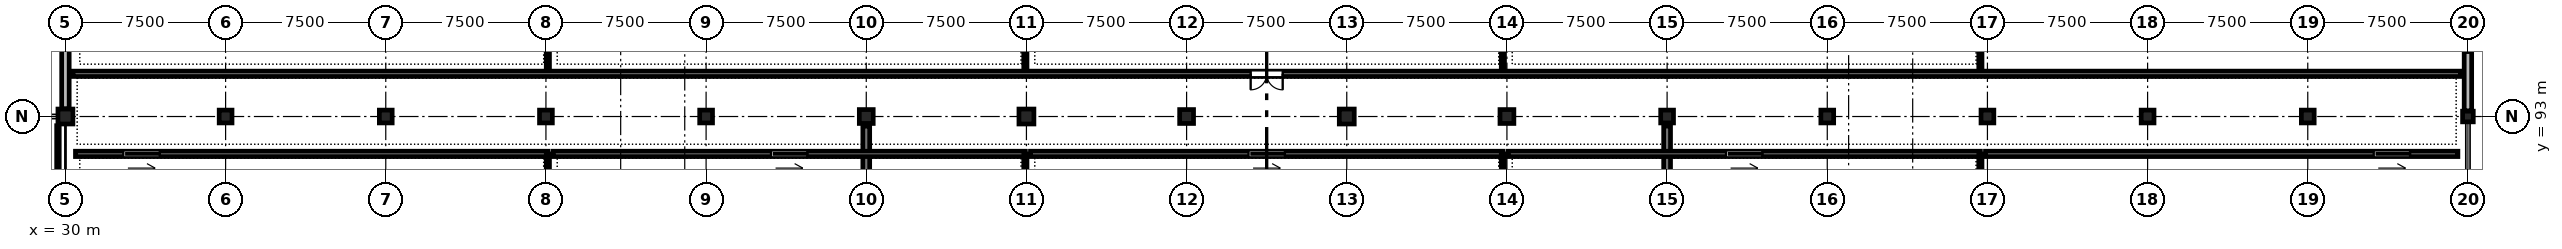
"""IFC4 building model, lengths in metres.
Left out: names, types, materials, properties, quantities, classifications, styles, units other than length and angle.
Written with IfcOpenShell. Run it as: python <this file> out.ifc"""

import sys

from ifc_helpers import new_model, si_unit, direction, frame, frame_2d, origin, origin_2d, place, context, subcontext, project, spatial, rectangle, circle, extrude, element, fill, save


model = new_model("IFC4")
c1 = context("Model", 3, precision=1e-05, world=origin(), true_north=direction((0.0, 1.0)))
c2 = subcontext(c1, "Body", "Model", "MODEL_VIEW")
j1 = project(units=[si_unit("LENGTHUNIT", "METRE"), si_unit("PLANEANGLEUNIT", "RADIAN")], contexts=[c1])
p1 = place(None, origin())
s1 = spatial("IfcSite", under=j1, at=p1, CompositionType="ELEMENT")
p2 = place(p1, origin())
s2 = spatial("IfcBuilding", under=s1, at=p2, CompositionType="ELEMENT")
p3 = place(p2, frame((0.0, 0.0, 9.3)))
s3 = spatial("IfcBuildingStorey", under=s2, at=p3, CompositionType="ELEMENT", Elevation=9.3)
p4 = place(p3, frame((30.0, 93.0, 0.0), z_axis=(0.0, 0.0, 1.0), x_axis=(1.0, 0.0, 0.0)))
e1 = element("IfcColumn", 1, at=p4, inside=s3, PredefinedType="COLUMN", context=c2, shape_type="SweptSolid", body=[
    extrude(rectangle(XDim=0.7, YDim=0.7, at=origin_2d()), origin(), (0.0, 0.0, 1.0), 4.8),
])
p5 = place(p3, frame((37.5, 93.0, 0.0), z_axis=(0.0, 0.0, 1.0), x_axis=(1.0, 0.0, 0.0)))
e2 = element("IfcColumn", 2, at=p5, inside=s3, PredefinedType="COLUMN", context=c2, shape_type="SweptSolid", body=[
    extrude(rectangle(XDim=0.6, YDim=0.6, at=origin_2d()), origin(), (0.0, 0.0, 1.0), 4.8),
])
p6 = place(p3, frame((45.0, 93.0, 0.0), z_axis=(0.0, 0.0, 1.0), x_axis=(1.0, 0.0, 0.0)))
e3 = element("IfcColumn", 3, at=p6, inside=s3, PredefinedType="COLUMN", context=c2, shape_type="SweptSolid", body=[
    extrude(circle(Radius=0.3, at=origin_2d()), origin(), (0.0, 0.0, 1.0), 4.8),
])
for number, where, z_axis, x_axis in (
    (4, (52.5, 93.0, 0.0), (0.0, 0.0, 1.0), (1.0, 0.0, 0.0)),
    (5, (60.0, 93.0, 0.0), (0.0, 0.0, 1.0), (1.0, 0.0, 0.0)),
):
    element("IfcColumn", number, at=place(p3, frame(where, z_axis=z_axis, x_axis=x_axis)), inside=s3, PredefinedType="COLUMN", context=c2, shape_type="SweptSolid", body=[
        extrude(rectangle(XDim=0.6, YDim=0.6, at=origin_2d()), origin(), (0.0, 0.0, 1.0), 4.8),
    ])
p7 = place(p3, frame((67.5, 93.0, 0.0), z_axis=(0.0, 0.0, 1.0), x_axis=(1.0, 0.0, 0.0)))
e6 = element("IfcColumn", 6, at=p7, inside=s3, PredefinedType="COLUMN", context=c2, shape_type="SweptSolid", body=[
    extrude(rectangle(XDim=0.65, YDim=0.65, at=origin_2d()), origin(), (0.0, 0.0, 1.0), 4.8),
])
p8 = place(p3, frame((75.0, 93.0, 0.0), z_axis=(0.0, 0.0, 1.0), x_axis=(1.0, 0.0, 0.0)))
e7 = element("IfcColumn", 7, at=p8, inside=s3, PredefinedType="COLUMN", context=c2, shape_type="SweptSolid", body=[
    extrude(rectangle(XDim=0.7, YDim=0.7, at=origin_2d()), origin(), (0.0, 0.0, 1.0), 4.8),
])
p9 = place(p3, frame((82.5, 93.0, 0.0), z_axis=(0.0, 0.0, 1.0), x_axis=(1.0, 0.0, 0.0)))
e8 = element("IfcColumn", 8, at=p9, inside=s3, PredefinedType="COLUMN", context=c2, shape_type="SweptSolid", body=[
    extrude(rectangle(XDim=0.65, YDim=0.65, at=origin_2d()), origin(), (0.0, 0.0, 1.0), 4.8),
])
p10 = place(p3, frame((90.0, 93.0, 0.0), z_axis=(0.0, 0.0, 1.0), x_axis=(1.0, 0.0, 0.0)))
e9 = element("IfcColumn", 9, at=p10, inside=s3, PredefinedType="COLUMN", context=c2, shape_type="SweptSolid", body=[
    extrude(rectangle(XDim=0.7, YDim=0.7, at=origin_2d()), origin(), (0.0, 0.0, 1.0), 4.8),
])
p11 = place(p3, frame((97.5, 93.0, 0.0), z_axis=(0.0, 0.0, 1.0), x_axis=(1.0, 0.0, 0.0)))
e10 = element("IfcColumn", 10, at=p11, inside=s3, PredefinedType="COLUMN", context=c2, shape_type="SweptSolid", body=[
    extrude(rectangle(XDim=0.65, YDim=0.65, at=origin_2d()), origin(), (0.0, 0.0, 1.0), 4.8),
])
p12 = place(p3, frame((105.0, 93.0, 0.0), z_axis=(0.0, 0.0, 1.0), x_axis=(1.0, 0.0, 0.0)))
e11 = element("IfcColumn", 11, at=p12, inside=s3, PredefinedType="COLUMN", context=c2, shape_type="SweptSolid", body=[
    extrude(rectangle(XDim=0.6, YDim=0.6, at=origin_2d()), origin(), (0.0, 0.0, 1.0), 4.8),
])
p13 = place(p3, frame((112.5, 93.0, 0.0), z_axis=(0.0, 0.0, 1.0), x_axis=(1.0, 0.0, 0.0)))
e12 = element("IfcColumn", 12, at=p13, inside=s3, PredefinedType="COLUMN", context=c2, shape_type="SweptSolid", body=[
    extrude(circle(Radius=0.3, at=origin_2d()), origin(), (0.0, 0.0, 1.0), 4.8),
])
for number, where, z_axis, x_axis in (
    (13, (120.0, 93.0, 0.0), (0.0, 0.0, 1.0), (1.0, 0.0, 0.0)),
    (14, (127.5, 93.0, 0.0), (0.0, 0.0, 1.0), (1.0, 0.0, 0.0)),
):
    element("IfcColumn", number, at=place(p3, frame(where, z_axis=z_axis, x_axis=x_axis)), inside=s3, PredefinedType="COLUMN", context=c2, shape_type="SweptSolid", body=[
        extrude(rectangle(XDim=0.6, YDim=0.6, at=origin_2d()), origin(), (0.0, 0.0, 1.0), 4.8),
    ])
p14 = place(p3, frame((135.0, 93.0, 0.0), z_axis=(0.0, 0.0, 1.0), x_axis=(1.0, 0.0, 0.0)))
e15 = element("IfcColumn", 15, at=p14, inside=s3, PredefinedType="COLUMN", context=c2, shape_type="SweptSolid", body=[
    extrude(circle(Radius=0.3, at=origin_2d()), origin(), (0.0, 0.0, 1.0), 4.8),
])
p15 = place(p3, frame((142.5, 93.0, 0.0), z_axis=(0.0, 0.0, 1.0), x_axis=(1.0, 0.0, 0.0)))
e16 = element("IfcColumn", 16, at=p15, inside=s3, PredefinedType="COLUMN", context=c2, shape_type="SweptSolid", body=[
    extrude(rectangle(XDim=0.5, YDim=0.5, at=origin_2d()), origin(), (0.0, 0.0, 1.0), 4.8),
])
for number, where, z_axis, x_axis in (
    (17, (67.5, 85.95, 0.0), (0.0, 0.0, 1.0), (0.0, 1.0, 0.0)),
    (18, (105.0, 85.95, 0.0), (0.0, 0.0, 1.0), (0.0, 1.0, 0.0)),
):
    element("IfcWall", number, at=place(p3, frame(where, z_axis=z_axis, x_axis=x_axis)), inside=s3, PredefinedType="SHEAR", context=c2, shape_type="SweptSolid", body=[
        extrude(rectangle(XDim=6.6, YDim=0.32, at=frame_2d((3.3, 0.0))), origin(), (0.0, 0.0, 1.0), 4.0),
    ])
p16 = place(p3, frame((30.0, 93.36, 0.0), z_axis=(0.0, 0.0, 1.0), x_axis=(0.0, 1.0, 0.0)))
e19 = element("IfcWall", 19, at=p16, inside=s3, PredefinedType="STANDARD", context=c2, shape_type="SweptSolid", body=[
    extrude(rectangle(XDim=6.88, YDim=0.35, at=frame_2d((3.44, 0.0))), origin(), (0.0, 0.0, 1.0), 3.95),
])
p17 = place(p16, frame((2.84, 0.0, 0.9)))
e20 = element("IfcOpeningElement", 20, at=p17, cuts=e19, PredefinedType="OPENING", context=c2, shape_type="SweptSolid", body=[
    extrude(rectangle(XDim=1.2, YDim=2.1, at=frame_2d((0.6, 1.05))), frame((0.0, 0.185, 0.0), z_axis=(0.0, -1.0, 0.0), x_axis=(1.0, 0.0, 0.0)), (0.0, 0.0, 1.0), 0.37),
])
p18 = place(p3, frame((142.5, 100.215, 0.0), z_axis=(0.0, 0.0, 1.0), x_axis=(0.0, -1.0, 0.0)))
e21 = element("IfcWall", 21, at=p18, inside=s3, PredefinedType="STANDARD", context=c2, shape_type="SweptSolid", body=[
    extrude(rectangle(XDim=6.955, YDim=0.35, at=frame_2d((3.478, 0.0))), origin(), (0.0, 0.0, 1.0), 3.95),
])
p19 = place(p18, frame((2.728, 0.0, 0.9)))
e22 = element("IfcOpeningElement", 22, at=p19, cuts=e21, PredefinedType="OPENING", context=c2, shape_type="SweptSolid", body=[
    extrude(rectangle(XDim=1.5, YDim=2.1, at=frame_2d((0.75, 1.05))), frame((0.0, 0.185, 0.0), z_axis=(0.0, -1.0, 0.0), x_axis=(1.0, 0.0, 0.0)), (0.0, 0.0, 1.0), 0.37),
])
p20 = place(p3, frame((142.15, 95.0, 0.0), z_axis=(0.0, 0.0, 1.0), x_axis=(-1.0, 0.0, 0.0)))
e23 = element("IfcWall", 23, at=p20, inside=s3, PredefinedType="STANDARD", context=c2, shape_type="SweptSolid", body=[
    extrude(rectangle(XDim=111.8, YDim=0.25, at=frame_2d((55.9, 0.0))), origin(), (0.0, 0.0, 1.0), 4.535),
])
p21 = place(p20, frame((55.15, 0.0, 0.0)))
e24 = element("IfcOpeningElement", 24, at=p21, cuts=e23, PredefinedType="OPENING", context=c2, shape_type="SweptSolid", body=[
    extrude(rectangle(XDim=1.5, YDim=2.3, at=frame_2d((0.75, 1.15))), frame((0.0, 0.135, 0.0), z_axis=(0.0, -1.0, 0.0), x_axis=(1.0, 0.0, 0.0)), (0.0, 0.0, 1.0), 0.27),
])
p22 = place(p3, frame((52.59, 91.25, 0.0), z_axis=(0.0, 0.0, 1.0), x_axis=(-1.0, 0.0, 0.0)))
e25 = element("IfcWall", 25, at=p22, inside=s3, PredefinedType="STANDARD", context=c2, shape_type="SweptSolid", body=[
    extrude(rectangle(XDim=22.12, YDim=0.25, at=frame_2d((11.06, 0.0))), origin(), (0.0, 0.0, 1.0), 4.535),
])
p23 = place(p22, frame((18.178, 0.0, 0.0)))
e26 = element("IfcOpeningElement", 26, at=p23, cuts=e25, PredefinedType="OPENING", context=c2, shape_type="SweptSolid", body=[
    extrude(rectangle(XDim=1.7, YDim=2.4, at=frame_2d((0.85, 1.2))), frame((0.0, 0.135, 0.0), z_axis=(0.0, -1.0, 0.0), x_axis=(1.0, 0.0, 0.0)), (0.0, 0.0, 1.0), 0.27),
])
p24 = place(p3, frame((74.95, 91.25, 0.0), z_axis=(0.0, 0.0, 1.0), x_axis=(-1.0, 0.0, 0.0)))
e27 = element("IfcWall", 27, at=p24, inside=s3, PredefinedType="STANDARD", context=c2, shape_type="SweptSolid", body=[
    extrude(rectangle(XDim=22.12, YDim=0.25, at=frame_2d((11.06, 0.0))), origin(), (0.0, 0.0, 1.0), 4.535),
])
p25 = place(p24, frame((10.21, 0.0, 0.0)))
e28 = element("IfcOpeningElement", 28, at=p25, cuts=e27, PredefinedType="OPENING", context=c2, shape_type="SweptSolid", body=[
    extrude(rectangle(XDim=1.7, YDim=2.4, at=frame_2d((0.85, 1.2))), frame((0.0, 0.135, 0.0), z_axis=(0.0, -1.0, 0.0), x_axis=(1.0, 0.0, 0.0)), (0.0, 0.0, 1.0), 0.27),
])
p26 = place(p3, frame((97.31, 91.25, 0.0), z_axis=(0.0, 0.0, 1.0), x_axis=(-1.0, 0.0, 0.0)))
e29 = element("IfcWall", 29, at=p26, inside=s3, PredefinedType="STANDARD", context=c2, shape_type="SweptSolid", body=[
    extrude(rectangle(XDim=22.12, YDim=0.25, at=frame_2d((11.06, 0.0))), origin(), (0.0, 0.0, 1.0), 4.535),
])
p27 = place(p26, frame((10.21, 0.0, 0.0)))
e30 = element("IfcOpeningElement", 30, at=p27, cuts=e29, PredefinedType="OPENING", context=c2, shape_type="SweptSolid", body=[
    extrude(rectangle(XDim=1.7, YDim=2.4, at=frame_2d((0.85, 1.2))), frame((0.0, 0.135, 0.0), z_axis=(0.0, -1.0, 0.0), x_axis=(1.0, 0.0, 0.0)), (0.0, 0.0, 1.0), 0.27),
])
p28 = place(p3, frame((119.67, 91.25, 0.0), z_axis=(0.0, 0.0, 1.0), x_axis=(-1.0, 0.0, 0.0)))
e31 = element("IfcWall", 31, at=p28, inside=s3, PredefinedType="STANDARD", context=c2, shape_type="SweptSolid", body=[
    extrude(rectangle(XDim=22.12, YDim=0.25, at=frame_2d((11.06, 0.0))), origin(), (0.0, 0.0, 1.0), 4.535),
])
p29 = place(p28, frame((10.21, 0.0, 0.0)))
e32 = element("IfcOpeningElement", 32, at=p29, cuts=e31, PredefinedType="OPENING", context=c2, shape_type="SweptSolid", body=[
    extrude(rectangle(XDim=1.7, YDim=2.4, at=frame_2d((0.85, 1.2))), frame((0.0, 0.135, 0.0), z_axis=(0.0, -1.0, 0.0), x_axis=(1.0, 0.0, 0.0)), (0.0, 0.0, 1.0), 0.27),
])
p30 = place(p3, frame((142.03, 91.25, 0.0), z_axis=(0.0, 0.0, 1.0), x_axis=(-1.0, 0.0, 0.0)))
e33 = element("IfcWall", 33, at=p30, inside=s3, PredefinedType="STANDARD", context=c2, shape_type="SweptSolid", body=[
    extrude(rectangle(XDim=22.12, YDim=0.25, at=frame_2d((11.06, 0.0))), origin(), (0.0, 0.0, 1.0), 4.535),
])
p31 = place(p30, frame((2.242, 0.0, 0.0)))
e34 = element("IfcOpeningElement", 34, at=p31, cuts=e33, PredefinedType="OPENING", context=c2, shape_type="SweptSolid", body=[
    extrude(rectangle(XDim=1.7, YDim=2.4, at=frame_2d((0.85, 1.2))), frame((0.0, 0.135, 0.0), z_axis=(0.0, -1.0, 0.0), x_axis=(1.0, 0.0, 0.0)), (0.0, 0.0, 1.0), 0.27),
])
p32 = place(p3, frame((52.59, 95.25, 0.0), z_axis=(0.0, 0.0, 1.0), x_axis=(0.0, 1.0, 0.0)))
e35 = element("IfcWall", 35, at=p32, inside=s3, PredefinedType="PARTITIONING", context=c2, shape_type="SweptSolid", body=[
    extrude(rectangle(XDim=10.3, YDim=0.15, at=frame_2d((5.15, 0.0))), origin(), (0.0, 0.0, 1.0), 3.835),
])
p33 = place(p3, frame((52.59, 76.85, 0.0), z_axis=(0.0, 0.0, 1.0), x_axis=(0.0, 1.0, 0.0)))
e36 = element("IfcWall", 36, at=p33, inside=s3, PredefinedType="PARTITIONING", context=c2, shape_type="SweptSolid", body=[
    extrude(rectangle(XDim=14.4, YDim=0.15, at=frame_2d((7.2, 0.0))), origin(), (0.0, 0.0, 1.0), 3.835),
])
p34 = place(p3, frame((74.95, 95.25, 0.0), z_axis=(0.0, 0.0, 1.0), x_axis=(0.0, 1.0, 0.0)))
e37 = element("IfcWall", 37, at=p34, inside=s3, PredefinedType="PARTITIONING", context=c2, shape_type="SweptSolid", body=[
    extrude(rectangle(XDim=10.3, YDim=0.15, at=frame_2d((5.15, 0.0))), origin(), (0.0, 0.0, 1.0), 3.835),
])
p35 = place(p3, frame((74.95, 76.85, 0.0), z_axis=(0.0, 0.0, 1.0), x_axis=(0.0, 1.0, 0.0)))
e38 = element("IfcWall", 38, at=p35, inside=s3, PredefinedType="PARTITIONING", context=c2, shape_type="SweptSolid", body=[
    extrude(rectangle(XDim=14.4, YDim=0.15, at=frame_2d((7.2, 0.0))), origin(), (0.0, 0.0, 1.0), 3.835),
])
p36 = place(p3, frame((97.31, 95.25, 0.0), z_axis=(0.0, 0.0, 1.0), x_axis=(0.0, 1.0, 0.0)))
e39 = element("IfcWall", 39, at=p36, inside=s3, PredefinedType="PARTITIONING", context=c2, shape_type="SweptSolid", body=[
    extrude(rectangle(XDim=10.3, YDim=0.15, at=frame_2d((5.15, 0.0))), origin(), (0.0, 0.0, 1.0), 3.835),
])
p37 = place(p3, frame((97.31, 76.85, 0.0), z_axis=(0.0, 0.0, 1.0), x_axis=(0.0, 1.0, 0.0)))
e40 = element("IfcWall", 40, at=p37, inside=s3, PredefinedType="PARTITIONING", context=c2, shape_type="SweptSolid", body=[
    extrude(rectangle(XDim=14.4, YDim=0.15, at=frame_2d((7.2, 0.0))), origin(), (0.0, 0.0, 1.0), 3.835),
])
p38 = place(p3, frame((119.67, 95.25, 0.0), z_axis=(0.0, 0.0, 1.0), x_axis=(0.0, 1.0, 0.0)))
e41 = element("IfcWall", 41, at=p38, inside=s3, PredefinedType="PARTITIONING", context=c2, shape_type="SweptSolid", body=[
    extrude(rectangle(XDim=10.3, YDim=0.15, at=frame_2d((5.15, 0.0))), origin(), (0.0, 0.0, 1.0), 3.835),
])
p39 = place(p3, frame((119.67, 76.85, 0.0), z_axis=(0.0, 0.0, 1.0), x_axis=(0.0, 1.0, 0.0)))
e42 = element("IfcWall", 42, at=p39, inside=s3, PredefinedType="PARTITIONING", context=c2, shape_type="SweptSolid", body=[
    extrude(rectangle(XDim=14.4, YDim=0.15, at=frame_2d((7.2, 0.0))), origin(), (0.0, 0.0, 1.0), 3.835),
])
p40 = place(p3, frame((29.65, 82.861, 0.0), z_axis=(0.0, 0.0, 1.0), x_axis=(0.0, 1.0, 0.0)))
e43 = element("IfcWall", 43, at=p40, inside=s3, PredefinedType="PARTITIONING", context=c2, shape_type="SweptSolid", body=[
    extrude(rectangle(XDim=9.709, YDim=0.12, at=frame_2d((4.854, 0.0))), origin(), (0.0, 0.0, 1.0), 3.835),
])
p41 = place(p19, origin())
e44 = element("IfcWindow", 44, at=p41, inside=s3, PartitioningType="SINGLE_PANEL", PredefinedType="WINDOW", context=c2, shape_type="SweptSolid", body=[
    extrude(rectangle(XDim=1.5, YDim=2.1, at=frame_2d((0.75, 1.05))), frame((0.0, 0.03, 0.0), z_axis=(0.0, -1.0, 0.0), x_axis=(1.0, 0.0, 0.0)), (0.0, 0.0, 1.0), 0.06),
])
fill(e22, e44)
p42 = place(p21, origin())
e45 = element("IfcDoor", 45, at=p42, inside=s3, OperationType="DOUBLE_DOOR_SINGLE_SWING", PredefinedType="DOOR", context=c2, shape_type="SweptSolid", body=[
    extrude(rectangle(XDim=1.5, YDim=2.3, at=frame_2d((0.75, 1.15))), frame((0.0, 0.025, 0.0), z_axis=(0.0, -1.0, 0.0), x_axis=(1.0, 0.0, 0.0)), (0.0, 0.0, 1.0), 0.05),
])
fill(e24, e45)
p43 = place(p23, origin())
e46 = element("IfcDoor", 46, at=p43, inside=s3, OperationType="DOUBLE_DOOR_SLIDING", PredefinedType="DOOR", context=c2, shape_type="SweptSolid", body=[
    extrude(rectangle(XDim=1.7, YDim=2.4, at=frame_2d((0.85, 1.2))), frame((0.0, 0.025, 0.0), z_axis=(0.0, -1.0, 0.0), x_axis=(1.0, 0.0, 0.0)), (0.0, 0.0, 1.0), 0.05),
])
fill(e26, e46)
p44 = place(p25, origin())
e47 = element("IfcDoor", 47, at=p44, inside=s3, OperationType="DOUBLE_DOOR_SLIDING", PredefinedType="DOOR", context=c2, shape_type="SweptSolid", body=[
    extrude(rectangle(XDim=1.7, YDim=2.4, at=frame_2d((0.85, 1.2))), frame((0.0, 0.025, 0.0), z_axis=(0.0, -1.0, 0.0), x_axis=(1.0, 0.0, 0.0)), (0.0, 0.0, 1.0), 0.05),
])
fill(e28, e47)
p45 = place(p27, origin())
e48 = element("IfcDoor", 48, at=p45, inside=s3, OperationType="DOUBLE_DOOR_SLIDING", PredefinedType="DOOR", context=c2, shape_type="SweptSolid", body=[
    extrude(rectangle(XDim=1.7, YDim=2.4, at=frame_2d((0.85, 1.2))), frame((0.0, 0.025, 0.0), z_axis=(0.0, -1.0, 0.0), x_axis=(1.0, 0.0, 0.0)), (0.0, 0.0, 1.0), 0.05),
])
fill(e30, e48)
p46 = place(p29, origin())
e49 = element("IfcDoor", 49, at=p46, inside=s3, OperationType="DOUBLE_DOOR_SLIDING", PredefinedType="DOOR", context=c2, shape_type="SweptSolid", body=[
    extrude(rectangle(XDim=1.7, YDim=2.4, at=frame_2d((0.85, 1.2))), frame((0.0, 0.025, 0.0), z_axis=(0.0, -1.0, 0.0), x_axis=(1.0, 0.0, 0.0)), (0.0, 0.0, 1.0), 0.05),
])
fill(e32, e49)
p47 = place(p31, origin())
e50 = element("IfcDoor", 50, at=p47, inside=s3, OperationType="DOUBLE_DOOR_SLIDING", PredefinedType="DOOR", context=c2, shape_type="SweptSolid", body=[
    extrude(rectangle(XDim=1.7, YDim=2.4, at=frame_2d((0.85, 1.2))), frame((0.0, 0.025, 0.0), z_axis=(0.0, -1.0, 0.0), x_axis=(1.0, 0.0, 0.0)), (0.0, 0.0, 1.0), 0.05),
])
fill(e34, e50)
save(model, sys.argv[1])
